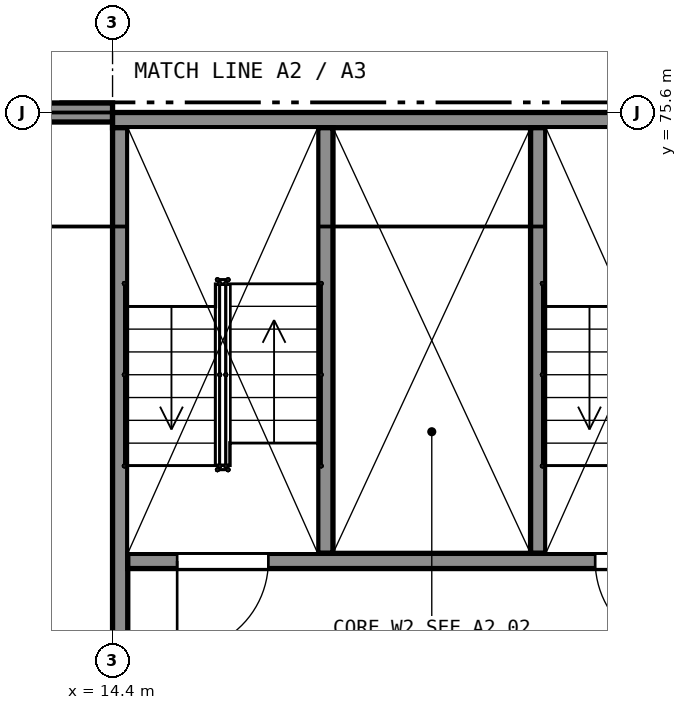
"""IFC4 building model, lengths in metres.
Left out: names, types, materials, properties, quantities, classifications, styles, units other than length and angle.
Written with IfcOpenShell. Run it as: python <this file> out.ifc"""

import sys

from ifc_helpers import new_model, si_unit, direction, frame, frame_2d, origin, place, context, subcontext, project, spatial, rectangle, extrude, element, fill, save


model = new_model("IFC4")
c1 = context("Model", 3, precision=1e-05, world=origin(), true_north=direction((0.0, 1.0)))
c2 = subcontext(c1, "Body", "Model", "MODEL_VIEW")
j1 = project(units=[si_unit("LENGTHUNIT", "METRE"), si_unit("PLANEANGLEUNIT", "RADIAN")], contexts=[c1])
p1 = place(None, origin())
s1 = spatial("IfcSite", under=j1, at=p1, CompositionType="ELEMENT")
p2 = place(p1, origin())
s2 = spatial("IfcBuilding", under=s1, at=p2, CompositionType="ELEMENT")
p3 = place(p2, frame((0.0, 0.0, 5.5)))
s3 = spatial("IfcBuildingStorey", under=s2, at=p3, CompositionType="ELEMENT", Elevation=5.5)
p4 = place(p3, frame((6.0, 75.7, 0.0), z_axis=(0.0, 0.0, 1.0), x_axis=(1.0, 0.0, 0.0)))
e1 = element("IfcWall", 1, at=p4, inside=s3, PredefinedType="SHEAR", context=c2, shape_type="SweptSolid", body=[
    extrude(rectangle(XDim=8.4, YDim=0.2, at=frame_2d((4.2, 0.0))), origin(), (0.0, 0.0, 1.0), 7.725),
])
p5 = place(p2, frame((0.0, 0.0, 10.5)))
s4 = spatial("IfcBuildingStorey", under=s2, at=p5, CompositionType="ELEMENT", Elevation=10.5)
p6 = place(p5, frame((14.4, 75.5, 0.0), z_axis=(0.0, 0.0, 1.0), x_axis=(1.0, 0.0, 0.0)))
e2 = element("IfcWall", 2, at=p6, inside=s4, PredefinedType="SHEAR", context=c2, shape_type="SweptSolid", body=[
    extrude(rectangle(XDim=8.4, YDim=0.2, at=frame_2d((4.2, 0.0))), origin(), (0.0, 0.0, 1.0), 9.5),
])
p7 = place(p5, frame((14.5, 67.4, 0.0), z_axis=(0.0, 0.0, 1.0), x_axis=(0.0, 1.0, 0.0)))
e3 = element("IfcWall", 3, at=p7, inside=s4, PredefinedType="SHEAR", context=c2, shape_type="SweptSolid", body=[
    extrude(rectangle(XDim=8.0, YDim=0.2, at=frame_2d((4.0, 0.0))), origin(), (0.0, 0.0, 1.0), 9.5),
])
p8 = place(p5, frame((14.6, 69.7, 0.0), z_axis=(0.0, 0.0, 1.0), x_axis=(1.0, 0.0, 0.0)))
e4 = element("IfcWall", 4, at=p8, inside=s4, PredefinedType="SHEAR", context=c2, shape_type="SweptSolid", body=[
    extrude(rectangle(XDim=8.0, YDim=0.2, at=frame_2d((4.0, 0.0))), origin(), (0.0, 0.0, 1.0), 9.5),
])
p9 = place(p8, frame((0.65, 0.0, 0.0)))
e5 = element("IfcOpeningElement", 5, at=p9, cuts=e4, PredefinedType="OPENING", context=c2, shape_type="SweptSolid", body=[
    extrude(rectangle(XDim=1.2, YDim=2.1, at=frame_2d((0.6, 1.05))), frame((0.0, 0.11, 0.0), z_axis=(0.0, -1.0, 0.0), x_axis=(1.0, 0.0, 0.0)), (0.0, 0.0, 1.0), 0.22),
])
p10 = place(p8, frame((6.15, 0.0, 0.0)))
e6 = element("IfcOpeningElement", 6, at=p10, cuts=e4, PredefinedType="OPENING", context=c2, shape_type="SweptSolid", body=[
    extrude(rectangle(XDim=1.2, YDim=2.1, at=frame_2d((0.6, 1.05))), frame((0.0, 0.11, 0.0), z_axis=(0.0, -1.0, 0.0), x_axis=(1.0, 0.0, 0.0)), (0.0, 0.0, 1.0), 0.22),
])
for number, where, z_axis, x_axis in (
    (7, (17.2, 69.8, 0.0), (0.0, 0.0, 1.0), (0.0, 1.0, 0.0)),
    (8, (20.0, 69.8, 0.0), (0.0, 0.0, 1.0), (0.0, 1.0, 0.0)),
):
    element("IfcWall", number, at=place(p5, frame(where, z_axis=z_axis, x_axis=x_axis)), inside=s4, PredefinedType="SHEAR", context=c2, shape_type="SweptSolid", body=[
        extrude(rectangle(XDim=5.6, YDim=0.2, at=frame_2d((2.8, 0.0))), origin(), (0.0, 0.0, 1.0), 9.5),
    ])
p11 = place(p5, frame((6.35, 75.6, 2.725), z_axis=(0.0, 0.0, 1.0), x_axis=(1.0, 0.0, 0.0)))
e9 = element("IfcWall", 9, at=p11, inside=s4, PredefinedType="SOLIDWALL", context=c2, shape_type="SweptSolid", body=[
    extrude(rectangle(XDim=8.05, YDim=0.25, at=frame_2d((4.025, 0.0))), origin(), (0.0, 0.0, 1.0), 5.715),
])
p12 = place(p9, origin())
e10 = element("IfcDoor", 10, at=p12, inside=s4, OperationType="SINGLE_SWING_LEFT", PredefinedType="DOOR", context=c2, shape_type="SweptSolid", body=[
    extrude(rectangle(XDim=1.2, YDim=2.1, at=frame_2d((0.6, 1.05))), frame((0.0, 0.025, 0.0), z_axis=(0.0, -1.0, 0.0), x_axis=(1.0, 0.0, 0.0)), (0.0, 0.0, 1.0), 0.05),
])
fill(e5, e10)
p13 = place(p10, origin())
e11 = element("IfcDoor", 11, at=p13, inside=s4, OperationType="SINGLE_SWING_RIGHT", PredefinedType="DOOR", context=c2, shape_type="SweptSolid", body=[
    extrude(rectangle(XDim=1.2, YDim=2.1, at=frame_2d((0.6, 1.05))), frame((0.0, 0.025, 0.0), z_axis=(0.0, -1.0, 0.0), x_axis=(1.0, 0.0, 0.0)), (0.0, 0.0, 1.0), 0.05),
])
fill(e6, e11)
save(model, sys.argv[1])
